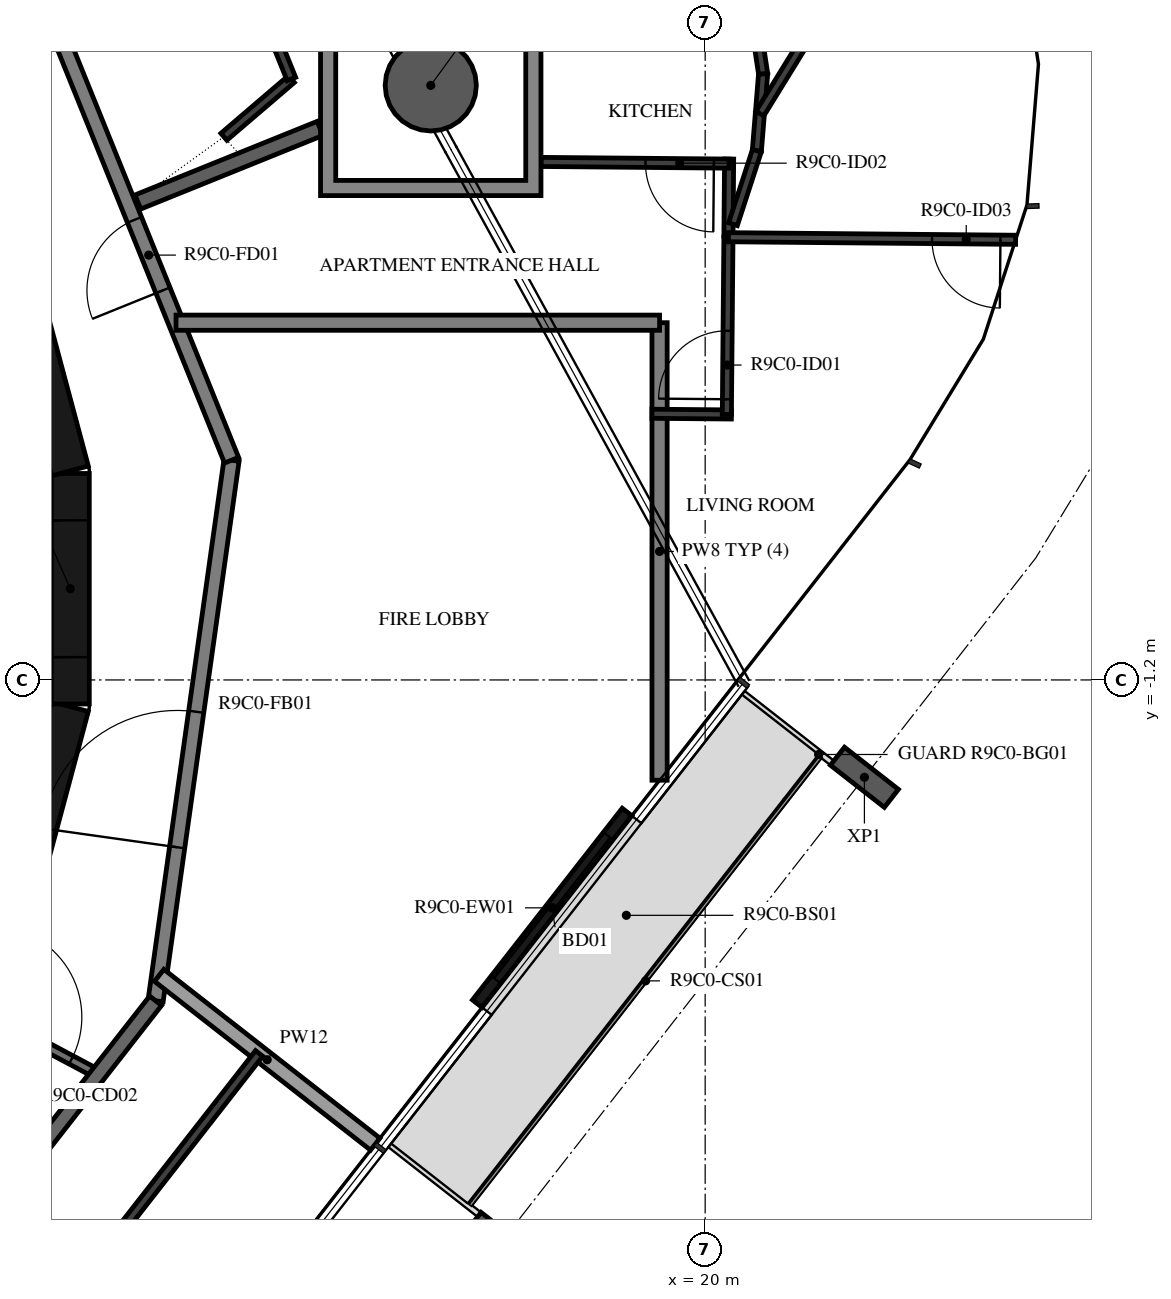
"""IFC4 building model, lengths in metres.
Left out: names, types, materials, properties, quantities, classifications, styles, units other than length and angle.
Written with IfcOpenShell. Run it as: python <this file> out.ifc"""

import sys

from ifc_helpers import new_model, si_unit, direction, frame, frame_2d, origin, origin_2d, place, context, subcontext, project, spatial, polyline, rectangle, hollow_circle, i_section, outline, extrude, element, fill, save


model = new_model("IFC4")
c1 = context("Model", 3, precision=1e-05, world=origin(), true_north=direction((0.0, 1.0)))
c2 = subcontext(c1, "Body", "Model", "MODEL_VIEW")
j1 = project(units=[si_unit("LENGTHUNIT", "METRE"), si_unit("PLANEANGLEUNIT", "RADIAN")], contexts=[c1])
p1 = place(None, origin())
s1 = spatial("IfcSite", under=j1, at=p1, CompositionType="ELEMENT")
p2 = place(p1, origin())
s2 = spatial("IfcBuilding", under=s1, at=p2, CompositionType="ELEMENT")
p3 = place(p2, frame((0.0, 0.0, 354.0)))
s3 = spatial("IfcBuildingStorey", under=s2, at=p3, CompositionType="ELEMENT", Elevation=354.0)
p4 = place(p3, frame((16.39, 6.622, -0.38), z_axis=(0.0, 0.0, 1.0), x_axis=(1.0, 0.0, 0.0)))
e1 = element("IfcColumn", 1, at=p4, inside=s3, PredefinedType="COLUMN", context=c2, shape_type="SweptSolid", body=[
    extrude(hollow_circle(Radius=0.6, WallThickness=0.03, at=origin_2d()), origin(), (0.0, 0.0, 1.0), 3.5),
])
for number, where, z_axis, x_axis in (
    (2, (17.314, -8.6, -0.38), (0.0, 0.0, 1.0), (-0.616, -0.788, 0.0)),
    (3, (22.095, -2.481, -0.38), (0.0, 0.0, 1.0), (-0.616, -0.788, 0.0)),
):
    element("IfcColumn", number, at=place(p3, frame(where, z_axis=z_axis, x_axis=x_axis)), inside=s3, PredefinedType="COLUMN", context=c2, shape_type="SweptSolid", body=[
        extrude(i_section(OverallWidth=0.3, OverallDepth=0.9, WebThickness=0.019, FlangeThickness=0.035, FilletRadius=0.03, at=origin_2d()), origin(), (0.0, 0.0, 1.0), 3.5),
    ])
p5 = place(p3, frame((17.002, -5.459, 0.0), z_axis=(0.0, 0.0, 1.0), x_axis=(0.615666248856, 0.788007024093, 0.0)))
e4 = element("IfcWall", 4, at=p5, inside=s3, PredefinedType="STANDARD", context=c2, shape_type="SweptSolid", body=[
    extrude(rectangle(XDim=3.2, YDim=0.16, at=frame_2d((1.6, 0.0))), origin(), (0.0, 0.0, 1.0), 3.12),
])
p6 = place(p5, frame((0.4, 0.0, 0.0)))
e5 = element("IfcOpeningElement", 5, at=p6, cuts=e4, PredefinedType="OPENING", context=c2, shape_type="SweptSolid", body=[
    extrude(rectangle(XDim=2.4, YDim=2.4, at=frame_2d((1.2, 1.2))), frame((0.0, 0.09, 0.0), z_axis=(0.0, -1.0, 0.0), x_axis=(1.0, 0.0, 0.0)), (0.0, 0.0, 1.0), 0.18),
])
p7 = place(p3, frame((10.858, -4.479, 0.0), z_axis=(0.0, 0.0, 1.0), x_axis=(0.258734743916, 0.965948410781, 0.0)))
e6 = element("IfcWall", 6, at=p7, inside=s3, PredefinedType="SHEAR", context=c2, shape_type="SweptSolid", body=[
    extrude(rectangle(XDim=3.033, YDim=0.5, at=frame_2d((1.516, 0.0))), origin(), (0.0, 0.0, 1.0), 3.12),
])
p8 = place(p3, frame((11.647, -1.516, 0.0), z_axis=(0.0, 0.0, 1.0), x_axis=(0.0, 1.0, 0.0)))
e7 = element("IfcWall", 7, at=p8, inside=s3, PredefinedType="SHEAR", context=c2, shape_type="SweptSolid", body=[
    extrude(rectangle(XDim=3.033, YDim=0.5, at=frame_2d((1.516, 0.0))), origin(), (0.0, 0.0, 1.0), 3.12),
])
p9 = place(p8, frame((0.616, 0.0, 0.0)))
e8 = element("IfcOpeningElement", 8, at=p9, cuts=e7, PredefinedType="OPENING", context=c2, shape_type="SweptSolid", body=[
    extrude(rectangle(XDim=1.8, YDim=2.1, at=frame_2d((0.9, 1.05))), frame((0.0, 0.26, 0.0), z_axis=(0.0, -1.0, 0.0), x_axis=(1.0, 0.0, 0.0)), (0.0, 0.0, 1.0), 0.52),
])
p10 = place(p3, frame((11.643, 1.55, 0.0), z_axis=(0.0, 0.0, 1.0), x_axis=(-0.258734743916, 0.965948410781, 0.0)))
e9 = element("IfcWall", 9, at=p10, inside=s3, PredefinedType="SHEAR", context=c2, shape_type="SweptSolid", body=[
    extrude(rectangle(XDim=3.033, YDim=0.5, at=frame_2d((1.516, 0.0))), origin(), (0.0, 0.0, 1.0), 3.12),
])
p11 = place(p3, frame((10.511, -5.589, 0.0), z_axis=(0.0, 0.0, 1.0), x_axis=(0.882959677414, -0.469448834337, 0.0)))
e10 = element("IfcWall", 10, at=p11, inside=s3, PredefinedType="PARTITIONING", context=c2, shape_type="SweptSolid", body=[
    extrude(rectangle(XDim=1.702, YDim=0.12, at=frame_2d((0.851, 0.0))), origin(), (0.0, 0.0, 1.0), 3.12),
])
p12 = place(p11, frame((0.1, 0.0, 0.0)))
e11 = element("IfcOpeningElement", 11, at=p12, cuts=e10, PredefinedType="OPENING", context=c2, shape_type="SweptSolid", body=[
    extrude(rectangle(XDim=1.2, YDim=2.1, at=frame_2d((0.6, 1.05))), frame((0.0, 0.07, 0.0), z_axis=(0.0, -1.0, 0.0), x_axis=(1.0, 0.0, 0.0)), (0.0, 0.0, 1.0), 0.14),
])
p13 = place(p3, frame((12.77, -5.42, 0.0), z_axis=(0.0, 0.0, 1.0), x_axis=(0.139155334385, 0.990270565508, 0.0)))
e12 = element("IfcWall", 12, at=p13, inside=s3, PredefinedType="STANDARD", context=c2, shape_type="SweptSolid", body=[
    extrude(rectangle(XDim=7.181, YDim=0.2, at=frame_2d((3.59, 0.0))), origin(), (0.0, 0.0, 1.0), 3.12),
])
p14 = place(p13, frame((2.039, 0.0, 0.0)))
e13 = element("IfcOpeningElement", 13, at=p14, cuts=e12, PredefinedType="OPENING", context=c2, shape_type="SweptSolid", body=[
    extrude(rectangle(XDim=1.8, YDim=2.1, at=frame_2d((0.9, 1.05))), frame((0.0, 0.11, 0.0), z_axis=(0.0, -1.0, 0.0), x_axis=(1.0, 0.0, 0.0)), (0.0, 0.0, 1.0), 0.22),
])
p15 = place(p3, frame((13.769, 1.691, 0.0), z_axis=(0.0, 0.0, 1.0), x_axis=(-0.374618189599, 0.92717916932, 0.0)))
e14 = element("IfcWall", 14, at=p15, inside=s3, PredefinedType="STANDARD", context=c2, shape_type="SweptSolid", body=[
    extrude(rectangle(XDim=7.181, YDim=0.2, at=frame_2d((3.591, 0.0))), origin(), (0.0, 0.0, 1.0), 3.12),
])
p16 = place(p15, frame((2.41, 0.0, 0.0)))
e15 = element("IfcOpeningElement", 15, at=p16, cuts=e14, PredefinedType="OPENING", context=c2, shape_type="SweptSolid", body=[
    extrude(rectangle(XDim=1.0, YDim=2.1, at=frame_2d((0.5, 1.05))), frame((0.0, 0.11, 0.0), z_axis=(0.0, -1.0, 0.0), x_axis=(1.0, 0.0, 0.0)), (0.0, 0.0, 1.0), 0.22),
])
p17 = place(p3, frame((8.349, -11.079, 0.0), z_axis=(0.0, 0.0, 1.0), x_axis=(0.615669112324, 0.78800478687, 0.0)))
e16 = element("IfcWall", 16, at=p17, inside=s3, PredefinedType="STANDARD", context=c2, shape_type="SweptSolid", body=[
    extrude(rectangle(XDim=7.181, YDim=0.2, at=frame_2d((3.591, 0.0))), origin(), (0.0, 0.0, 1.0), 3.12),
])
p18 = place(p3, frame((19.4, -2.519, 0.0), z_axis=(0.0, 0.0, 1.0), x_axis=(0.0, 1.0, 0.0)))
e17 = element("IfcWall", 17, at=p18, inside=s3, PredefinedType="STANDARD", context=c2, shape_type="SweptSolid", body=[
    extrude(rectangle(XDim=6.019, YDim=0.2, at=frame_2d((3.01, 0.0))), origin(), (0.0, 0.0, 1.0), 3.12),
])
p19 = place(p3, frame((19.4, 3.5, 0.0), z_axis=(0.0, 0.0, 1.0), x_axis=(-1.0, 0.0, 0.0)))
e18 = element("IfcWall", 18, at=p19, inside=s3, PredefinedType="STANDARD", context=c2, shape_type="SweptSolid", body=[
    extrude(rectangle(XDim=6.362, YDim=0.2, at=frame_2d((3.181, 0.0))), origin(), (0.0, 0.0, 1.0), 3.12),
])
p20 = place(p3, frame((12.817, -5.086, 0.0), z_axis=(0.0, 0.0, 1.0), x_axis=(0.787994616725, -0.615682129034, 0.0)))
e19 = element("IfcWall", 19, at=p20, inside=s3, PredefinedType="STANDARD", context=c2, shape_type="SweptSolid", body=[
    extrude(rectangle(XDim=3.607, YDim=0.2, at=frame_2d((1.804, 0.0))), origin(), (0.0, 0.0, 1.0), 2.73),
])
p21 = place(p3, frame((14.934, 6.056, 0.0), z_axis=(0.0, 0.0, 1.0), x_axis=(-0.927181938396, -0.374611336071, 0.0)))
e20 = element("IfcWall", 20, at=p21, inside=s3, PredefinedType="STANDARD", context=c2, shape_type="SweptSolid", body=[
    extrude(rectangle(XDim=2.586, YDim=0.2, at=frame_2d((1.293, 0.0))), origin(), (0.0, 0.0, 1.0), 3.12),
])
p22 = place(p3, frame((19.3, 2.302, 0.0), z_axis=(0.0, 0.0, 1.0), x_axis=(0.999958506341, -0.009109643015, 0.0)))
e21 = element("IfcWall", 21, at=p22, inside=s3, PredefinedType="PARTITIONING", context=c2, shape_type="SweptSolid", body=[
    extrude(rectangle(XDim=1.045, YDim=0.12, at=frame_2d((0.522, 0.0))), origin(), (0.0, 0.0, 1.0), 3.12),
])
p23 = place(p3, frame((20.285, 2.293, 0.0), z_axis=(0.0, 0.0, 1.0), x_axis=(0.008900171034, 0.999960392693, 0.0)))
e22 = element("IfcWall", 22, at=p23, inside=s3, PredefinedType="PARTITIONING", context=c2, shape_type="SweptSolid", body=[
    extrude(rectangle(XDim=2.332, YDim=0.12, at=frame_2d((1.166, 0.0))), origin(), (0.0, 0.0, 1.0), 3.12),
])
p24 = place(p23, frame((0.2, 0.0, 0.0)))
e23 = element("IfcOpeningElement", 23, at=p24, cuts=e22, PredefinedType="OPENING", context=c2, shape_type="SweptSolid", body=[
    extrude(rectangle(XDim=0.9, YDim=2.1, at=frame_2d((0.45, 1.05))), frame((0.0, 0.07, 0.0), z_axis=(0.0, -1.0, 0.0), x_axis=(1.0, 0.0, 0.0)), (0.0, 0.0, 1.0), 0.14),
])
p25 = place(p3, frame((20.306, 4.639, 0.0), z_axis=(0.0, 0.0, 1.0), x_axis=(0.008906724211, 0.999960334345, 0.0)))
e24 = element("IfcWall", 24, at=p25, inside=s3, PredefinedType="PARTITIONING", context=c2, shape_type="SweptSolid", body=[
    extrude(rectangle(XDim=1.014, YDim=0.12, at=frame_2d((0.507, 0.0))), origin(), (0.0, 0.0, 1.0), 3.12),
])
p26 = place(p3, frame((20.315, 5.593, 0.0), z_axis=(0.0, 0.0, 1.0), x_axis=(-0.999960597409, 0.008877140833, 0.0)))
e25 = element("IfcWall", 25, at=p26, inside=s3, PredefinedType="PARTITIONING", context=c2, shape_type="SweptSolid", body=[
    extrude(rectangle(XDim=2.475, YDim=0.12, at=frame_2d((1.238, 0.0))), origin(), (0.0, 0.0, 1.0), 3.12),
])
p27 = place(p26, frame((0.2, 0.0, 0.0)))
e26 = element("IfcOpeningElement", 26, at=p27, cuts=e25, PredefinedType="OPENING", context=c2, shape_type="SweptSolid", body=[
    extrude(rectangle(XDim=0.9, YDim=2.1, at=frame_2d((0.45, 1.05))), frame((0.0, 0.07, 0.0), z_axis=(0.0, -1.0, 0.0), x_axis=(1.0, 0.0, 0.0)), (0.0, 0.0, 1.0), 0.14),
])
p28 = place(p3, frame((24.085, 4.591, 0.0), z_axis=(0.0, 0.0, 1.0), x_axis=(-0.99996025077, 0.008916102255, 0.0)))
e27 = element("IfcWall", 27, at=p28, inside=s3, PredefinedType="PARTITIONING", context=c2, shape_type="SweptSolid", body=[
    extrude(rectangle(XDim=3.779, YDim=0.12, at=frame_2d((1.889, 0.0))), origin(), (0.0, 0.0, 1.0), 2.73),
])
p29 = place(p28, frame((0.2, 0.0, 0.0)))
e28 = element("IfcOpeningElement", 28, at=p29, cuts=e27, PredefinedType="OPENING", context=c2, shape_type="SweptSolid", body=[
    extrude(rectangle(XDim=0.9, YDim=2.1, at=frame_2d((0.45, 1.05))), frame((0.0, 0.07, 0.0), z_axis=(0.0, -1.0, 0.0), x_axis=(1.0, 0.0, 0.0)), (0.0, 0.0, 1.0), 0.14),
])
p30 = place(p3, frame((20.762, 6.775, 0.0), z_axis=(0.0, 0.0, 1.0), x_axis=(-0.08121587, -0.996696534789, 0.0)))
e29 = element("IfcWall", 29, at=p30, inside=s3, PredefinedType="PARTITIONING", context=c2, shape_type="SweptSolid", body=[
    extrude(rectangle(XDim=1.016, YDim=0.12, at=frame_2d((0.508, 0.0))), origin(), (0.0, 0.0, 1.0), 3.12),
])
p31 = place(p3, frame((20.68, 5.762, 0.0), z_axis=(0.0, 0.0, 1.0), x_axis=(-0.30908063779, -0.951035834942, 0.0)))
e30 = element("IfcWall", 30, at=p31, inside=s3, PredefinedType="PARTITIONING", context=c2, shape_type="SweptSolid", body=[
    extrude(rectangle(XDim=1.016, YDim=0.12, at=frame_2d((0.508, 0.0))), origin(), (0.0, 0.0, 1.0), 3.12),
])
p32 = place(p3, frame((23.357, 10.532, 0.0), z_axis=(0.0, 0.0, 1.0), x_axis=(-0.524476563806, -0.851424884542, 0.0)))
e31 = element("IfcWall", 31, at=p32, inside=s3, PredefinedType="PARTITIONING", context=c2, shape_type="SweptSolid", body=[
    extrude(rectangle(XDim=5.029, YDim=0.12, at=frame_2d((2.515, 0.0))), origin(), (0.0, 0.0, 1.0), 3.12),
])
p33 = place(p32, frame((1.5, 0.0, 0.0)))
e32 = element("IfcOpeningElement", 32, at=p33, cuts=e31, PredefinedType="OPENING", context=c2, shape_type="SweptSolid", body=[
    extrude(rectangle(XDim=0.8, YDim=2.1, at=frame_2d((0.4, 1.05))), frame((0.0, 0.07, 0.0), z_axis=(0.0, -1.0, 0.0), x_axis=(1.0, 0.0, 0.0)), (0.0, 0.0, 1.0), 0.14),
])
p34 = place(p3, frame((20.762, 6.775, 0.0), z_axis=(0.0, 0.0, 1.0), x_axis=(-0.150702440861, 0.988579169474, 0.0)))
e33 = element("IfcWall", 33, at=p34, inside=s3, PredefinedType="PARTITIONING", context=c2, shape_type="SweptSolid", body=[
    extrude(rectangle(XDim=1.016, YDim=0.12, at=frame_2d((0.508, 0.0))), origin(), (0.0, 0.0, 1.0), 3.12),
])
p35 = place(p3, frame((13.668, 5.946, 0.0), z_axis=(0.0, 0.0, 1.0), x_axis=(0.759993221436, 0.649930998931, 0.0)))
e34 = element("IfcWall", 34, at=p35, inside=s3, PredefinedType="PARTITIONING", context=c2, shape_type="SweptSolid", body=[
    extrude(rectangle(XDim=1.169, YDim=0.12, at=frame_2d((0.584, 0.0))), origin(), (0.0, 0.0, 1.0), 3.12),
])
p36 = place(p3, frame((14.556, 6.706, 0.0), z_axis=(0.0, 0.0, 1.0), x_axis=(-0.374599774633, 0.927186609505, 0.0)))
e35 = element("IfcWall", 35, at=p36, inside=s3, PredefinedType="PARTITIONING", context=c2, shape_type="SweptSolid", body=[
    extrude(rectangle(XDim=3.159, YDim=0.12, at=frame_2d((1.58, 0.0))), origin(), (0.0, 0.0, 1.0), 3.12),
])
p37 = place(p36, frame((1.3, 0.0, 0.0)))
e36 = element("IfcOpeningElement", 36, at=p37, cuts=e35, PredefinedType="OPENING", context=c2, shape_type="SweptSolid", body=[
    extrude(rectangle(XDim=0.9, YDim=2.1, at=frame_2d((0.45, 1.05))), frame((0.0, 0.07, 0.0), z_axis=(0.0, -1.0, 0.0), x_axis=(1.0, 0.0, 0.0)), (0.0, 0.0, 1.0), 0.14),
])
p38 = place(p3, frame((9.283, -12.319, 0.0), z_axis=(0.0, 0.0, 1.0), x_axis=(0.615666903036, 0.788006512985, 0.0)))
e37 = element("IfcWall", 37, at=p38, inside=s3, PredefinedType="PARTITIONING", context=c2, shape_type="SweptSolid", body=[
    extrude(rectangle(XDim=7.875, YDim=0.12, at=frame_2d((3.938, 0.0))), origin(), (0.0, 0.0, 1.0), 3.12),
])
p39 = place(p3, origin())
e38 = element("IfcWall", 38, at=p39, inside=s3, PredefinedType="STANDARD", context=c2, shape_type="SweptSolid", body=[
    extrude(outline(polyline([(17.84, 8.072), (17.84, 5.172), (14.94, 5.172), (14.94, 8.072), (17.84, 8.072)]), holes=[polyline([(15.14, 5.372), (17.64, 5.372), (17.64, 7.872), (15.14, 7.872), (15.14, 5.372)])]), origin(), (0.0, 0.0, 1.0), 3.12),
])
p40 = place(p6, origin())
e39 = element("IfcDoor", 39, at=p40, inside=s3, OperationType="DOUBLE_DOOR_SLIDING", PredefinedType="DOOR", context=c2, shape_type="SweptSolid", body=[
    extrude(rectangle(XDim=2.4, YDim=2.4, at=frame_2d((1.2, 1.2))), frame((0.0, 0.025, 0.0), z_axis=(0.0, -1.0, 0.0), x_axis=(1.0, 0.0, 0.0)), (0.0, 0.0, 1.0), 0.05),
])
fill(e5, e39)
p41 = place(p9, origin())
e40 = element("IfcDoor", 40, at=p41, inside=s3, OperationType="DOUBLE_DOOR_SINGLE_SWING", PredefinedType="DOOR", context=c2, shape_type="SweptSolid", body=[
    extrude(rectangle(XDim=1.8, YDim=2.1, at=frame_2d((0.9, 1.05))), frame((0.0, 0.025, 0.0), z_axis=(0.0, -1.0, 0.0), x_axis=(1.0, 0.0, 0.0)), (0.0, 0.0, 1.0), 0.05),
])
fill(e8, e40)
p42 = place(p16, origin())
e41 = element("IfcDoor", 41, at=p42, inside=s3, OperationType="SINGLE_SWING_LEFT", PredefinedType="DOOR", context=c2, shape_type="SweptSolid", body=[
    extrude(rectangle(XDim=1.0, YDim=2.1, at=frame_2d((0.5, 1.05))), frame((0.0, 0.025, 0.0), z_axis=(0.0, -1.0, 0.0), x_axis=(1.0, 0.0, 0.0)), (0.0, 0.0, 1.0), 0.05),
])
fill(e15, e41)
p43 = place(p24, origin())
e42 = element("IfcDoor", 42, at=p43, inside=s3, OperationType="SINGLE_SWING_RIGHT", PredefinedType="DOOR", context=c2, shape_type="SweptSolid", body=[
    extrude(rectangle(XDim=0.9, YDim=2.1, at=frame_2d((0.45, 1.05))), frame((0.0, 0.025, 0.0), z_axis=(0.0, -1.0, 0.0), x_axis=(1.0, 0.0, 0.0)), (0.0, 0.0, 1.0), 0.05),
])
fill(e23, e42)
p44 = place(p27, origin())
e43 = element("IfcDoor", 43, at=p44, inside=s3, OperationType="SINGLE_SWING_RIGHT", PredefinedType="DOOR", context=c2, shape_type="SweptSolid", body=[
    extrude(rectangle(XDim=0.9, YDim=2.1, at=frame_2d((0.45, 1.05))), frame((0.0, 0.025, 0.0), z_axis=(0.0, -1.0, 0.0), x_axis=(1.0, 0.0, 0.0)), (0.0, 0.0, 1.0), 0.05),
])
fill(e26, e43)
p45 = place(p29, origin())
e44 = element("IfcDoor", 44, at=p45, inside=s3, OperationType="SINGLE_SWING_RIGHT", PredefinedType="DOOR", context=c2, shape_type="SweptSolid", body=[
    extrude(rectangle(XDim=0.9, YDim=2.1, at=frame_2d((0.45, 1.05))), frame((0.0, 0.025, 0.0), z_axis=(0.0, -1.0, 0.0), x_axis=(1.0, 0.0, 0.0)), (0.0, 0.0, 1.0), 0.05),
])
fill(e28, e44)
p46 = place(p12, origin())
e45 = element("IfcDoor", 45, at=p46, inside=s3, OperationType="DOUBLE_DOOR_SINGLE_SWING", PredefinedType="DOOR", context=c2, shape_type="SweptSolid", body=[
    extrude(rectangle(XDim=1.2, YDim=2.1, at=frame_2d((0.6, 1.05))), frame((0.0, 0.025, 0.0), z_axis=(0.0, -1.0, 0.0), x_axis=(1.0, 0.0, 0.0)), (0.0, 0.0, 1.0), 0.05),
])
fill(e11, e45)
p47 = place(p14, origin())
e46 = element("IfcDoor", 46, at=p47, inside=s3, OperationType="DOUBLE_DOOR_SINGLE_SWING", PredefinedType="DOOR", context=c2, shape_type="SweptSolid", body=[
    extrude(rectangle(XDim=1.8, YDim=2.1, at=frame_2d((0.9, 1.05))), frame((0.0, 0.025, 0.0), z_axis=(0.0, -1.0, 0.0), x_axis=(1.0, 0.0, 0.0)), (0.0, 0.0, 1.0), 0.05),
])
fill(e13, e46)
save(model, sys.argv[1])
